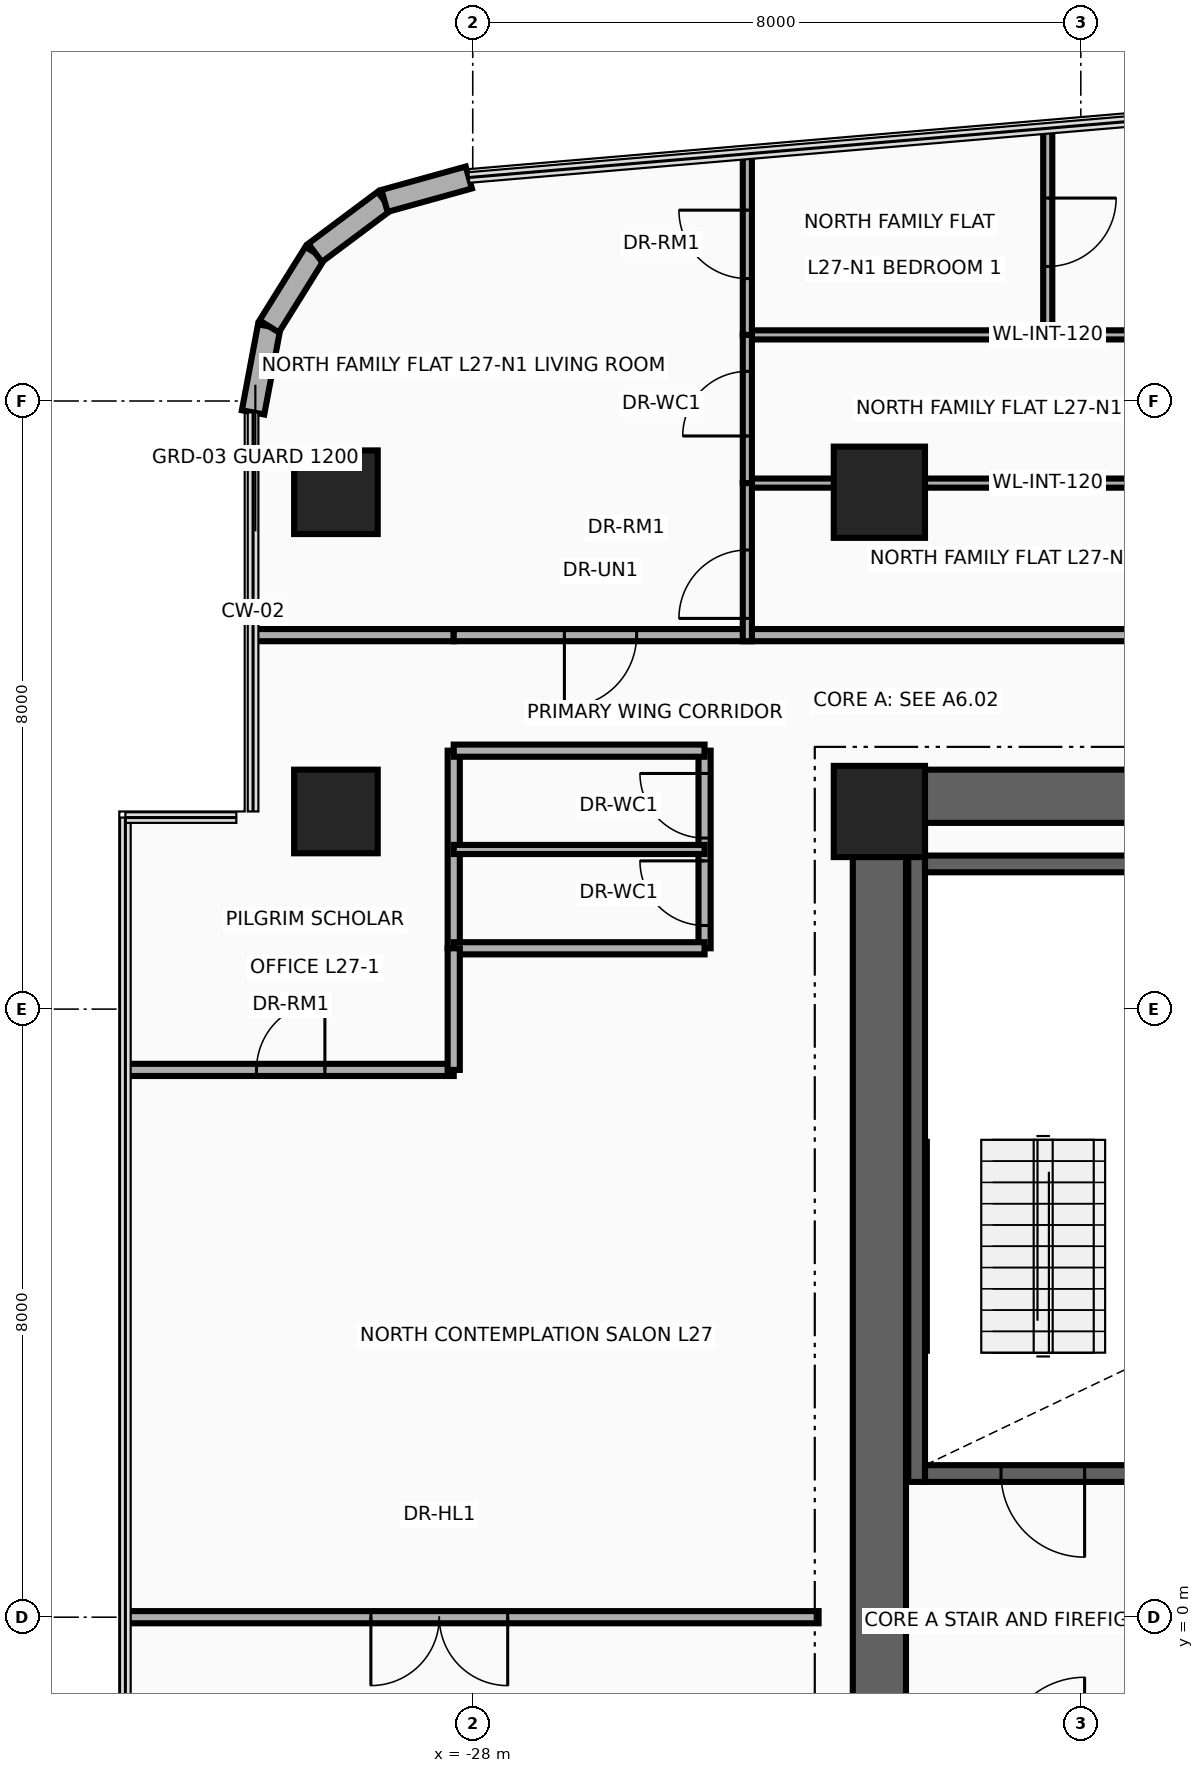
"""IFC4 building model, lengths in metres.
Left out: names, types, materials, properties, quantities, classifications, styles, units other than length and angle.
Written with IfcOpenShell. Run it as: python <this file> out.ifc"""

import sys

from ifc_helpers import new_model, si_unit, direction, frame, frame_2d, origin, origin_2d, place, context, subcontext, project, spatial, rectangle, circle, extrude, source, transform, mapped, element, fill, save


model = new_model("IFC4")
c1 = context("Model", 3, precision=1e-05, world=origin(), true_north=direction((0.0, 1.0)))
c2 = subcontext(c1, "Body", "Model", "MODEL_VIEW")
j1 = project(units=[si_unit("LENGTHUNIT", "METRE"), si_unit("PLANEANGLEUNIT", "RADIAN")], contexts=[c1])
p1 = place(None, origin())
s1 = spatial("IfcSite", under=j1, at=p1, CompositionType="ELEMENT")
p2 = place(p1, origin())
s2 = spatial("IfcBuilding", under=s1, at=p2, CompositionType="ELEMENT")
p3 = place(p2, frame((0.0, 0.0, 109.4)))
s3 = spatial("IfcBuildingStorey", under=s2, at=p3, CompositionType="ELEMENT", Elevation=109.4)
p4 = place(p3, frame((-22.16, 1.78, 0.0), z_axis=(0.0, 0.0, 1.0), x_axis=(0.0, 1.0, 0.0)))
e1 = element("IfcWall", 1, at=p4, inside=s3, PredefinedType="SHEAR", context=c2, shape_type="SweptSolid", body=[
    extrude(rectangle(XDim=8.67, YDim=0.22, at=frame_2d((4.335, 0.0))), origin(), (0.0, 0.0, 1.0), 3.46),
])
p5 = place(p3, frame((-22.05, 1.89, 0.0), z_axis=(0.0, 0.0, 1.0), x_axis=(1.0, 0.0, 0.0)))
e2 = element("IfcWall", 2, at=p5, inside=s3, PredefinedType="SHEAR", context=c2, shape_type="SweptSolid", body=[
    extrude(rectangle(XDim=3.11, YDim=0.22, at=frame_2d((1.555, 0.0))), origin(), (0.0, 0.0, 1.0), 3.46),
])
p6 = place(p5, frame((1.0, 0.0, 0.0)))
e3 = element("IfcOpeningElement", 3, at=p6, cuts=e2, PredefinedType="OPENING", context=c2, shape_type="SweptSolid", body=[
    extrude(rectangle(XDim=1.1, YDim=2.15, at=frame_2d((0.55, 1.075))), frame((0.0, 0.125, 0.0), z_axis=(0.0, -1.0, 0.0), x_axis=(1.0, 0.0, 0.0)), (0.0, 0.0, 1.0), 0.25),
])
p7 = place(p3, frame((-22.05, 9.91, 0.0), z_axis=(0.0, 0.0, 1.0), x_axis=(1.0, 0.0, 0.0)))
e4 = element("IfcWall", 4, at=p7, inside=s3, PredefinedType="SHEAR", context=c2, shape_type="SweptSolid", body=[
    extrude(rectangle(XDim=3.11, YDim=0.22, at=frame_2d((1.555, 0.0))), origin(), (0.0, 0.0, 1.0), 3.46),
])
p8 = place(p3, frame((-22.65, -11.15, 0.0), z_axis=(0.0, 0.0, 1.0), x_axis=(0.0, 1.0, 0.0)))
e5 = element("IfcWall", 5, at=p8, inside=s3, PredefinedType="SHEAR", context=c2, shape_type="SweptSolid", body=[
    extrude(rectangle(XDim=22.3, YDim=0.7, at=frame_2d((11.15, 0.0))), origin(), (0.0, 0.0, 1.0), 3.46),
])
p9 = place(p3, frame((-22.65, 10.8, 0.0), z_axis=(0.0, 0.0, 1.0), x_axis=(1.0, 0.0, 0.0)))
e6 = element("IfcWall", 6, at=p9, inside=s3, PredefinedType="SHEAR", context=c2, shape_type="SweptSolid", body=[
    extrude(rectangle(XDim=10.25, YDim=0.7, at=frame_2d((5.125, 0.0))), origin(), (0.0, 0.0, 1.0), 3.46),
])
m1 = source(origin(), c2, "Body", "SweptSolid", [
    extrude(circle(Radius=0.55, at=origin_2d()), origin(), (0.0, 0.0, 1.0), 3.7),
])
p10 = place(p3, frame((-29.8, 10.6, 0.0), z_axis=(0.0, 0.0, 1.0), x_axis=(1.0, 0.0, 0.0)))
e7 = element("IfcColumn", 7, at=p10, inside=s3, PredefinedType="COLUMN", context=c2, shape_type="MappedRepresentation", body=[
    mapped(m1, transform((0.0, 0.0, 0.0), x_axis=(1.0, 0.0, 0.0), y_axis=(0.0, 1.0, 0.0), z_axis=(0.0, 0.0, 1.0), scale=1.0)),
])
m2 = source(origin(), c2, "Body", "SweptSolid", [
    extrude(rectangle(XDim=1.2, YDim=1.2, at=origin_2d()), origin(), (0.0, 0.0, 1.0), 3.7),
])
p11 = place(p3, frame((-22.65, 10.6, 0.0), z_axis=(0.0, 0.0, 1.0), x_axis=(1.0, 0.0, 0.0)))
e8 = element("IfcColumn", 8, at=p11, inside=s3, PredefinedType="COLUMN", context=c2, shape_type="MappedRepresentation", body=[
    mapped(m2, transform((0.0, 0.0, 0.0), x_axis=(1.0, 0.0, 0.0), y_axis=(0.0, 1.0, 0.0), z_axis=(0.0, 0.0, 1.0), scale=1.0)),
])
p12 = place(p3, frame((-29.8, 14.8, 0.0), z_axis=(0.0, 0.0, 1.0), x_axis=(1.0, 0.0, 0.0)))
e9 = element("IfcColumn", 9, at=p12, inside=s3, PredefinedType="COLUMN", context=c2, shape_type="MappedRepresentation", body=[
    mapped(m1, transform((0.0, 0.0, 0.0), x_axis=(1.0, 0.0, 0.0), y_axis=(0.0, 1.0, 0.0), z_axis=(0.0, 0.0, 1.0), scale=1.0)),
])
p13 = place(p3, frame((-22.65, 14.8, 0.0), z_axis=(0.0, 0.0, 1.0), x_axis=(1.0, 0.0, 0.0)))
e10 = element("IfcColumn", 10, at=p13, inside=s3, PredefinedType="COLUMN", context=c2, shape_type="MappedRepresentation", body=[
    mapped(m2, transform((0.0, 0.0, 0.0), x_axis=(1.0, 0.0, 0.0), y_axis=(0.0, 1.0, 0.0), z_axis=(0.0, 0.0, 1.0), scale=1.0)),
])
p14 = place(p3, frame((-30.89, 15.85, 0.0), z_axis=(0.0, 0.0, 1.0), x_axis=(0.184557499391, 0.982821718023, 0.0)))
e11 = element("IfcWall", 11, at=p14, inside=s3, PredefinedType="SOLIDWALL", context=c2, shape_type="SweptSolid", body=[
    extrude(rectangle(XDim=1.151, YDim=0.3, at=frame_2d((0.575, 0.0))), origin(), (0.0, 0.0, 1.0), 3.46),
])
p15 = place(p3, frame((-30.677, 16.981, 0.0), z_axis=(0.0, 0.0, 1.0), x_axis=(0.52880576008, 0.848742875143, 0.0)))
e12 = element("IfcWall", 12, at=p15, inside=s3, PredefinedType="SOLIDWALL", context=c2, shape_type="SweptSolid", body=[
    extrude(rectangle(XDim=1.141, YDim=0.3, at=frame_2d((0.57, 0.0))), origin(), (0.0, 0.0, 1.0), 3.46),
])
p16 = place(p3, frame((-30.074, 17.95, 0.0), z_axis=(0.0, 0.0, 1.0), x_axis=(0.800975009324, 0.598697782223, 0.0)))
e13 = element("IfcWall", 13, at=p16, inside=s3, PredefinedType="SOLIDWALL", context=c2, shape_type="SweptSolid", body=[
    extrude(rectangle(XDim=1.141, YDim=0.3, at=frame_2d((0.57, 0.0))), origin(), (0.0, 0.0, 1.0), 3.46),
])
p17 = place(p3, frame((-29.161, 18.633, 0.0), z_axis=(0.0, 0.0, 1.0), x_axis=(0.963624193367, 0.267260947313, 0.0)))
e14 = element("IfcWall", 14, at=p17, inside=s3, PredefinedType="SOLIDWALL", context=c2, shape_type="SweptSolid", body=[
    extrude(rectangle(XDim=1.151, YDim=0.3, at=frame_2d((0.575, 0.0))), origin(), (0.0, 0.0, 1.0), 3.46),
])
p18 = place(p3, frame((-28.25, 8.8, 0.0), z_axis=(0.0, 0.0, 1.0), x_axis=(0.0, 1.0, 0.0)))
e15 = element("IfcWall", 15, at=p18, inside=s3, PredefinedType="PARTITIONING", context=c2, shape_type="SweptSolid", body=[
    extrude(rectangle(XDim=2.6, YDim=0.16, at=frame_2d((1.3, 0.0))), origin(), (0.0, 0.0, 1.0), 2.666),
])
p19 = place(p3, frame((-24.95, 8.8, 0.0), z_axis=(0.0, 0.0, 1.0), x_axis=(0.0, 1.0, 0.0)))
e16 = element("IfcWall", 16, at=p19, inside=s3, PredefinedType="PARTITIONING", context=c2, shape_type="SweptSolid", body=[
    extrude(rectangle(XDim=2.6, YDim=0.16, at=frame_2d((1.3, 0.0))), origin(), (0.0, 0.0, 1.0), 2.666),
])
p20 = place(p19, frame((0.3, 0.0, 0.0)))
e17 = element("IfcOpeningElement", 17, at=p20, cuts=e16, PredefinedType="OPENING", context=c2, shape_type="SweptSolid", body=[
    extrude(rectangle(XDim=0.85, YDim=2.1, at=frame_2d((0.425, 1.05))), frame((0.0, 0.095, 0.0), z_axis=(0.0, -1.0, 0.0), x_axis=(1.0, 0.0, 0.0)), (0.0, 0.0, 1.0), 0.19),
])
p21 = place(p19, frame((1.45, 0.0, 0.0)))
e18 = element("IfcOpeningElement", 18, at=p21, cuts=e16, PredefinedType="OPENING", context=c2, shape_type="SweptSolid", body=[
    extrude(rectangle(XDim=0.85, YDim=2.1, at=frame_2d((0.425, 1.05))), frame((0.0, 0.095, 0.0), z_axis=(0.0, -1.0, 0.0), x_axis=(1.0, 0.0, 0.0)), (0.0, 0.0, 1.0), 0.19),
])
for number, where, z_axis, x_axis in (
    (19, (-28.25, 8.8, 0.0), (0.0, 0.0, 1.0), (1.0, 0.0, 0.0)),
    (20, (-28.25, 11.4, 0.0), (0.0, 0.0, 1.0), (1.0, 0.0, 0.0)),
):
    element("IfcWall", number, at=place(p3, frame(where, z_axis=z_axis, x_axis=x_axis)), inside=s3, PredefinedType="PARTITIONING", context=c2, shape_type="SweptSolid", body=[
        extrude(rectangle(XDim=3.3, YDim=0.16, at=frame_2d((1.65, 0.0))), origin(), (0.0, 0.0, 1.0), 3.46),
    ])
p22 = place(p3, frame((-28.25, 10.1, 0.0), z_axis=(0.0, 0.0, 1.0), x_axis=(1.0, 0.0, 0.0)))
e21 = element("IfcWall", 21, at=p22, inside=s3, PredefinedType="PARTITIONING", context=c2, shape_type="SweptSolid", body=[
    extrude(rectangle(XDim=3.3, YDim=0.12, at=frame_2d((1.65, 0.0))), origin(), (0.0, 0.0, 1.0), 3.46),
])
p23 = place(p3, frame((-32.54, 7.2, 0.0), z_axis=(0.0, 0.0, 1.0), x_axis=(1.0, 0.0, 0.0)))
e22 = element("IfcWall", 22, at=p23, inside=s3, PredefinedType="PARTITIONING", context=c2, shape_type="SweptSolid", body=[
    extrude(rectangle(XDim=4.29, YDim=0.16, at=frame_2d((2.145, 0.0))), origin(), (0.0, 0.0, 1.0), 2.896),
])
p24 = place(p23, frame((1.695, 0.0, 0.0)))
e23 = element("IfcOpeningElement", 23, at=p24, cuts=e22, PredefinedType="OPENING", context=c2, shape_type="SweptSolid", body=[
    extrude(rectangle(XDim=0.9, YDim=2.1, at=frame_2d((0.45, 1.05))), frame((0.0, 0.095, 0.0), z_axis=(0.0, -1.0, 0.0), x_axis=(1.0, 0.0, 0.0)), (0.0, 0.0, 1.0), 0.19),
])
p25 = place(p3, frame((-28.25, 7.2, 0.0), z_axis=(0.0, 0.0, 1.0), x_axis=(0.0, 1.0, 0.0)))
e24 = element("IfcWall", 24, at=p25, inside=s3, PredefinedType="PARTITIONING", context=c2, shape_type="SweptSolid", body=[
    extrude(rectangle(XDim=1.6, YDim=0.16, at=frame_2d((0.8, 0.0))), origin(), (0.0, 0.0, 1.0), 2.988),
])
p26 = place(p3, frame((-32.54, 0.0, 0.0), z_axis=(0.0, 0.0, 1.0), x_axis=(1.0, 0.0, 0.0)))
e25 = element("IfcWall", 25, at=p26, inside=s3, PredefinedType="PARTITIONING", context=c2, shape_type="SweptSolid", body=[
    extrude(rectangle(XDim=9.09, YDim=0.16, at=frame_2d((4.545, 0.0))), origin(), (0.0, 0.0, 1.0), 2.896),
])
p27 = place(p26, frame((3.2, 0.0, 0.0)))
e26 = element("IfcOpeningElement", 26, at=p27, cuts=e25, PredefinedType="OPENING", context=c2, shape_type="SweptSolid", body=[
    extrude(rectangle(XDim=1.8, YDim=2.15, at=frame_2d((0.9, 1.075))), frame((0.0, 0.095, 0.0), z_axis=(0.0, -1.0, 0.0), x_axis=(1.0, 0.0, 0.0)), (0.0, 0.0, 1.0), 0.19),
])
p28 = place(p3, frame((-30.89, 12.92, 0.0), z_axis=(0.0, 0.0, 1.0), x_axis=(1.0, 0.0, 0.0)))
e27 = element("IfcWall", 27, at=p28, inside=s3, PredefinedType="PARTITIONING", context=c2, shape_type="SweptSolid", body=[
    extrude(rectangle(XDim=2.64, YDim=0.16, at=frame_2d((1.32, 0.0))), origin(), (0.0, 0.0, 1.0), 2.896),
])
p29 = place(p3, frame((-28.25, 12.92, 0.0), z_axis=(0.0, 0.0, 1.0), x_axis=(1.0, 0.0, 0.0)))
e28 = element("IfcWall", 28, at=p29, inside=s3, PredefinedType="PARTITIONING", context=c2, shape_type="SweptSolid", body=[
    extrude(rectangle(XDim=41.8, YDim=0.16, at=frame_2d((20.9, 0.0))), origin(), (0.0, 0.0, 1.0), 2.666),
])
p30 = place(p29, frame((1.456, 0.0, 0.0)))
e29 = element("IfcOpeningElement", 29, at=p30, cuts=e28, PredefinedType="OPENING", context=c2, shape_type="SweptSolid", body=[
    extrude(rectangle(XDim=0.95, YDim=2.15, at=frame_2d((0.475, 1.075))), frame((0.0, 0.095, 0.0), z_axis=(0.0, -1.0, 0.0), x_axis=(1.0, 0.0, 0.0)), (0.0, 0.0, 1.0), 0.19),
])
p31 = place(p29, frame((14.167, 0.0, 0.0)))
e30 = element("IfcOpeningElement", 30, at=p31, cuts=e28, PredefinedType="OPENING", context=c2, shape_type="SweptSolid", body=[
    extrude(rectangle(XDim=0.95, YDim=2.15, at=frame_2d((0.475, 1.075))), frame((0.0, 0.095, 0.0), z_axis=(0.0, -1.0, 0.0), x_axis=(1.0, 0.0, 0.0)), (0.0, 0.0, 1.0), 0.19),
])
p32 = place(p29, frame((30.587, 0.0, 0.0)))
e31 = element("IfcOpeningElement", 31, at=p32, cuts=e28, PredefinedType="OPENING", context=c2, shape_type="SweptSolid", body=[
    extrude(rectangle(XDim=0.95, YDim=2.15, at=frame_2d((0.475, 1.075))), frame((0.0, 0.095, 0.0), z_axis=(0.0, -1.0, 0.0), x_axis=(1.0, 0.0, 0.0)), (0.0, 0.0, 1.0), 0.19),
])
p33 = place(p3, frame((-24.387, 14.92, 0.0), z_axis=(0.0, 0.0, 1.0), x_axis=(1.0, 0.0, 0.0)))
e32 = element("IfcWall", 32, at=p33, inside=s3, PredefinedType="PARTITIONING", context=c2, shape_type="SweptSolid", body=[
    extrude(rectangle(XDim=7.904, YDim=0.12, at=frame_2d((3.952, 0.0))), origin(), (0.0, 0.0, 1.0), 2.666),
])
p34 = place(p3, frame((-24.387, 16.87, 0.0), z_axis=(0.0, 0.0, 1.0), x_axis=(1.0, 0.0, 0.0)))
e33 = element("IfcWall", 33, at=p34, inside=s3, PredefinedType="PARTITIONING", context=c2, shape_type="SweptSolid", body=[
    extrude(rectangle(XDim=7.904, YDim=0.12, at=frame_2d((3.952, 0.0))), origin(), (0.0, 0.0, 1.0), 3.46),
])
p35 = place(p3, frame((-24.387, 14.92, 0.0), z_axis=(0.0, 0.0, 1.0), x_axis=(0.0, 1.0, 0.0)))
e34 = element("IfcWall", 34, at=p35, inside=s3, PredefinedType="PARTITIONING", context=c2, shape_type="SweptSolid", body=[
    extrude(rectangle(XDim=1.95, YDim=0.12, at=frame_2d((0.975, 0.0))), origin(), (0.0, 0.0, 1.0), 2.666),
])
p36 = place(p35, frame((0.62, 0.0, 0.0)))
e35 = element("IfcOpeningElement", 35, at=p36, cuts=e34, PredefinedType="OPENING", context=c2, shape_type="SweptSolid", body=[
    extrude(rectangle(XDim=0.85, YDim=2.1, at=frame_2d((0.425, 1.05))), frame((0.0, 0.075, 0.0), z_axis=(0.0, -1.0, 0.0), x_axis=(1.0, 0.0, 0.0)), (0.0, 0.0, 1.0), 0.15),
])
p37 = place(p3, frame((-24.387, 12.84, 0.0), z_axis=(0.0, 0.0, 1.0), x_axis=(0.0, 1.0, 0.0)))
e36 = element("IfcWall", 36, at=p37, inside=s3, PredefinedType="PARTITIONING", context=c2, shape_type="SweptSolid", body=[
    extrude(rectangle(XDim=2.08, YDim=0.12, at=frame_2d((1.04, 0.0))), origin(), (0.0, 0.0, 1.0), 2.666),
])
p38 = place(p37, frame((0.3, 0.0, 0.0)))
e37 = element("IfcOpeningElement", 37, at=p38, cuts=e36, PredefinedType="OPENING", context=c2, shape_type="SweptSolid", body=[
    extrude(rectangle(XDim=0.9, YDim=2.1, at=frame_2d((0.45, 1.05))), frame((0.0, 0.075, 0.0), z_axis=(0.0, -1.0, 0.0), x_axis=(1.0, 0.0, 0.0)), (0.0, 0.0, 1.0), 0.15),
])
p39 = place(p3, frame((-24.387, 16.87, 0.0), z_axis=(0.0, 0.0, 1.0), x_axis=(0.0, 1.0, 0.0)))
e38 = element("IfcWall", 38, at=p39, inside=s3, PredefinedType="PARTITIONING", context=c2, shape_type="SweptSolid", body=[
    extrude(rectangle(XDim=2.382, YDim=0.12, at=frame_2d((1.191, 0.0))), origin(), (0.0, 0.0, 1.0), 3.46),
])
p40 = place(p39, frame((0.741, 0.0, 0.0)))
e39 = element("IfcOpeningElement", 39, at=p40, cuts=e38, PredefinedType="OPENING", context=c2, shape_type="SweptSolid", body=[
    extrude(rectangle(XDim=0.9, YDim=2.1, at=frame_2d((0.45, 1.05))), frame((0.0, 0.075, 0.0), z_axis=(0.0, -1.0, 0.0), x_axis=(1.0, 0.0, 0.0)), (0.0, 0.0, 1.0), 0.15),
])
p41 = place(p3, frame((-20.435, 16.87, 0.0), z_axis=(0.0, 0.0, 1.0), x_axis=(0.0, 1.0, 0.0)))
e40 = element("IfcWall", 40, at=p41, inside=s3, PredefinedType="PARTITIONING", context=c2, shape_type="SweptSolid", body=[
    extrude(rectangle(XDim=2.718, YDim=0.12, at=frame_2d((1.359, 0.0))), origin(), (0.0, 0.0, 1.0), 3.46),
])
p42 = place(p41, frame((0.9, 0.0, 0.0)))
e41 = element("IfcOpeningElement", 41, at=p42, cuts=e40, PredefinedType="OPENING", context=c2, shape_type="SweptSolid", body=[
    extrude(rectangle(XDim=0.9, YDim=2.1, at=frame_2d((0.45, 1.05))), frame((0.0, 0.075, 0.0), z_axis=(0.0, -1.0, 0.0), x_axis=(1.0, 0.0, 0.0)), (0.0, 0.0, 1.0), 0.15),
])
p43 = place(p6, frame((1.1, 0.0, 0.0), z_axis=(0.0, 0.0, 1.0), x_axis=(-1.0, 0.0, 0.0)))
e42 = element("IfcDoor", 42, at=p43, inside=s3, OperationType="SINGLE_SWING_LEFT", PredefinedType="DOOR", context=c2, shape_type="SweptSolid", body=[
    extrude(rectangle(XDim=1.1, YDim=2.15, at=frame_2d((0.55, 1.075))), frame((0.0, 0.025, 0.0), z_axis=(0.0, -1.0, 0.0), x_axis=(1.0, 0.0, 0.0)), (0.0, 0.0, 1.0), 0.05),
])
fill(e3, e42)
p44 = place(p20, origin())
e43 = element("IfcDoor", 43, at=p44, inside=s3, OperationType="SINGLE_SWING_RIGHT", PredefinedType="DOOR", context=c2, shape_type="SweptSolid", body=[
    extrude(rectangle(XDim=0.85, YDim=2.1, at=frame_2d((0.425, 1.05))), frame((0.0, 0.025, 0.0), z_axis=(0.0, -1.0, 0.0), x_axis=(1.0, 0.0, 0.0)), (0.0, 0.0, 1.0), 0.05),
])
fill(e17, e43)
p45 = place(p21, origin())
e44 = element("IfcDoor", 44, at=p45, inside=s3, OperationType="SINGLE_SWING_LEFT", PredefinedType="DOOR", context=c2, shape_type="SweptSolid", body=[
    extrude(rectangle(XDim=0.85, YDim=2.1, at=frame_2d((0.425, 1.05))), frame((0.0, 0.025, 0.0), z_axis=(0.0, -1.0, 0.0), x_axis=(1.0, 0.0, 0.0)), (0.0, 0.0, 1.0), 0.05),
])
fill(e18, e44)
p46 = place(p24, origin())
e45 = element("IfcDoor", 45, at=p46, inside=s3, OperationType="SINGLE_SWING_RIGHT", PredefinedType="DOOR", context=c2, shape_type="SweptSolid", body=[
    extrude(rectangle(XDim=0.9, YDim=2.1, at=frame_2d((0.45, 1.05))), frame((0.0, 0.025, 0.0), z_axis=(0.0, -1.0, 0.0), x_axis=(1.0, 0.0, 0.0)), (0.0, 0.0, 1.0), 0.05),
])
fill(e23, e45)
p47 = place(p27, frame((1.8, 0.0, 0.0), z_axis=(0.0, 0.0, 1.0), x_axis=(-1.0, 0.0, 0.0)))
e46 = element("IfcDoor", 46, at=p47, inside=s3, OperationType="DOUBLE_DOOR_SINGLE_SWING", PredefinedType="DOOR", context=c2, shape_type="SweptSolid", body=[
    extrude(rectangle(XDim=1.8, YDim=2.15, at=frame_2d((0.9, 1.075))), frame((0.0, 0.025, 0.0), z_axis=(0.0, -1.0, 0.0), x_axis=(1.0, 0.0, 0.0)), (0.0, 0.0, 1.0), 0.05),
])
fill(e26, e46)
p48 = place(p30, frame((0.95, 0.0, 0.0), z_axis=(0.0, 0.0, 1.0), x_axis=(-1.0, 0.0, 0.0)))
e47 = element("IfcDoor", 47, at=p48, inside=s3, OperationType="SINGLE_SWING_LEFT", PredefinedType="DOOR", context=c2, shape_type="SweptSolid", body=[
    extrude(rectangle(XDim=0.95, YDim=2.15, at=frame_2d((0.475, 1.075))), frame((0.0, 0.025, 0.0), z_axis=(0.0, -1.0, 0.0), x_axis=(1.0, 0.0, 0.0)), (0.0, 0.0, 1.0), 0.05),
])
fill(e29, e47)
p49 = place(p36, origin())
e48 = element("IfcDoor", 48, at=p49, inside=s3, OperationType="SINGLE_SWING_RIGHT", PredefinedType="DOOR", context=c2, shape_type="SweptSolid", body=[
    extrude(rectangle(XDim=0.85, YDim=2.1, at=frame_2d((0.425, 1.05))), frame((0.0, 0.025, 0.0), z_axis=(0.0, -1.0, 0.0), x_axis=(1.0, 0.0, 0.0)), (0.0, 0.0, 1.0), 0.05),
])
fill(e35, e48)
p50 = place(p38, origin())
e49 = element("IfcDoor", 49, at=p50, inside=s3, OperationType="SINGLE_SWING_LEFT", PredefinedType="DOOR", context=c2, shape_type="SweptSolid", body=[
    extrude(rectangle(XDim=0.9, YDim=2.1, at=frame_2d((0.45, 1.05))), frame((0.0, 0.025, 0.0), z_axis=(0.0, -1.0, 0.0), x_axis=(1.0, 0.0, 0.0)), (0.0, 0.0, 1.0), 0.05),
])
fill(e37, e49)
p51 = place(p40, origin())
e50 = element("IfcDoor", 50, at=p51, inside=s3, OperationType="SINGLE_SWING_RIGHT", PredefinedType="DOOR", context=c2, shape_type="SweptSolid", body=[
    extrude(rectangle(XDim=0.9, YDim=2.1, at=frame_2d((0.45, 1.05))), frame((0.0, 0.025, 0.0), z_axis=(0.0, -1.0, 0.0), x_axis=(1.0, 0.0, 0.0)), (0.0, 0.0, 1.0), 0.05),
])
fill(e39, e50)
p52 = place(p42, frame((0.9, 0.0, 0.0), z_axis=(0.0, 0.0, 1.0), x_axis=(-1.0, 0.0, 0.0)))
e51 = element("IfcDoor", 51, at=p52, inside=s3, OperationType="SINGLE_SWING_LEFT", PredefinedType="DOOR", context=c2, shape_type="SweptSolid", body=[
    extrude(rectangle(XDim=0.9, YDim=2.1, at=frame_2d((0.45, 1.05))), frame((0.0, 0.025, 0.0), z_axis=(0.0, -1.0, 0.0), x_axis=(1.0, 0.0, 0.0)), (0.0, 0.0, 1.0), 0.05),
])
fill(e41, e51)
save(model, sys.argv[1])
